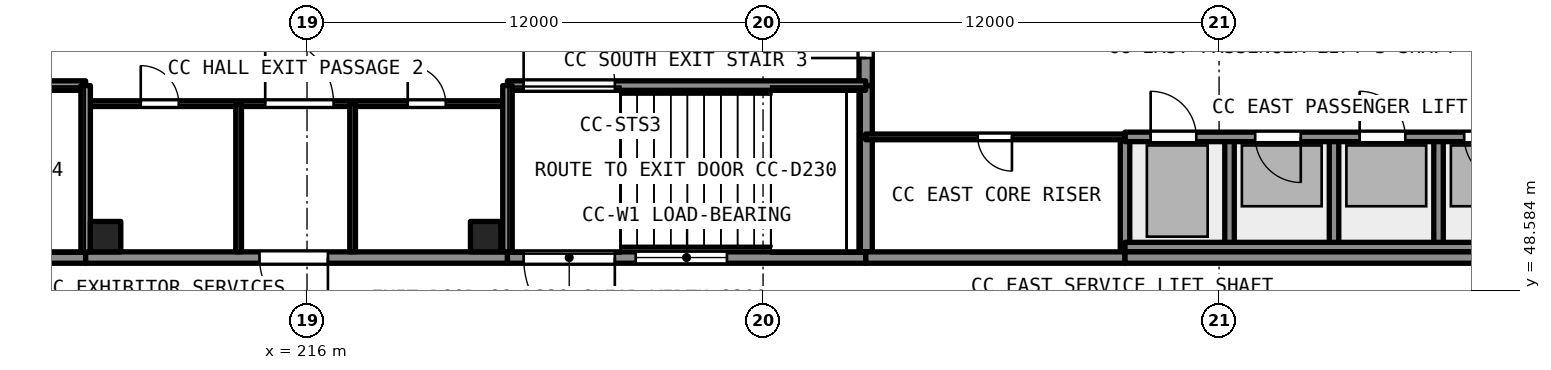
"""IFC4 building model, lengths in metres.
Left out: names, types, materials, properties, quantities, classifications, styles, units other than length and angle.
Written with IfcOpenShell. Run it as: python <this file> out.ifc"""

import sys

from ifc_helpers import new_model, si_unit, direction, frame, frame_2d, origin, origin_2d, place, context, subcontext, project, spatial, rectangle, extrude, element, fill, save


model = new_model("IFC4")
c1 = context("Model", 3, precision=1e-05, world=origin(), true_north=direction((0.0, 1.0)))
c2 = subcontext(c1, "Body", "Model", "MODEL_VIEW")
j1 = project(units=[si_unit("LENGTHUNIT", "METRE"), si_unit("PLANEANGLEUNIT", "RADIAN")], contexts=[c1])
p1 = place(None, origin())
s1 = spatial("IfcSite", under=j1, at=p1, CompositionType="ELEMENT")
p2 = place(p1, origin())
s2 = spatial("IfcBuilding", under=s1, at=p2, CompositionType="ELEMENT")
p3 = place(p2, origin())
s3 = spatial("IfcBuildingStorey", under=s2, at=p3, CompositionType="ELEMENT", Elevation=0.0)
for number, where, z_axis, x_axis in (
    (1, (210.7, 50.0, -1.2), (0.0, 0.0, 1.0), (1.0, 0.0, 0.0)),
    (2, (220.7, 50.0, -1.2), (0.0, 0.0, 1.0), (1.0, 0.0, 0.0)),
):
    element("IfcColumn", number, at=place(p3, frame(where, z_axis=z_axis, x_axis=x_axis)), inside=s3, PredefinedType="COLUMN", context=c2, shape_type="SweptSolid", body=[
        extrude(rectangle(XDim=0.8, YDim=0.8, at=origin_2d()), origin(), (0.0, 0.0, 1.0), 10.2),
    ])
p4 = place(p3, frame((230.7, 49.6, 0.0), z_axis=(0.0, 0.0, 1.0), x_axis=(0.0, 1.0, 0.0)))
e3 = element("IfcWall", 3, at=p4, inside=s3, PredefinedType="SHEAR", context=c2, shape_type="SweptSolid", body=[
    extrude(rectangle(XDim=4.375, YDim=0.35, at=frame_2d((2.188, 0.0))), origin(), (0.0, 0.0, 1.0), 8.59),
])
p5 = place(p3, frame((230.7, 53.975, 0.0), z_axis=(0.0, 0.0, 1.0), x_axis=(0.0, 1.0, 0.0)))
e4 = element("IfcWall", 4, at=p5, inside=s3, PredefinedType="SHEAR", context=c2, shape_type="SweptSolid", body=[
    extrude(rectangle(XDim=2.875, YDim=0.35, at=frame_2d((1.438, 0.0))), origin(), (0.0, 0.0, 1.0), 8.59),
])
p6 = place(p5, frame((0.725, 0.0, 0.0)))
e5 = element("IfcOpeningElement", 5, at=p6, cuts=e4, PredefinedType="OPENING", context=c2, shape_type="SweptSolid", body=[
    extrude(rectangle(XDim=1.8, YDim=2.1, at=frame_2d((0.9, 1.05))), frame((0.0, 0.186, 0.0), z_axis=(0.0, -1.0, 0.0), x_axis=(1.0, 0.0, 0.0)), (0.0, 0.0, 1.0), 0.371),
])
for number, where, z_axis, x_axis in (
    (6, (245.775, 49.6, -1.2), (0.0, 0.0, 1.0), (0.0, 1.0, 0.0)),
    (7, (243.025, 49.6, -1.2), (0.0, 0.0, 1.0), (0.0, 1.0, 0.0)),
    (8, (240.275, 49.6, -1.2), (0.0, 0.0, 1.0), (0.0, 1.0, 0.0)),
    (9, (237.525, 49.6, -1.2), (0.0, 0.0, 1.0), (0.0, 1.0, 0.0)),
):
    element("IfcWall", number, at=place(p3, frame(where, z_axis=z_axis, x_axis=x_axis)), inside=s3, PredefinedType="SHEAR", context=c2, shape_type="SweptSolid", body=[
        extrude(rectangle(XDim=3.025, YDim=0.25, at=frame_2d((1.512, 0.0))), origin(), (0.0, 0.0, 1.0), 26.19),
    ])
p7 = place(p3, frame((237.525, 52.625, -1.2), z_axis=(0.0, 0.0, 1.0), x_axis=(1.0, 0.0, 0.0)))
e10 = element("IfcWall", 10, at=p7, inside=s3, PredefinedType="SHEAR", context=c2, shape_type="SweptSolid", body=[
    extrude(rectangle(XDim=11.0, YDim=0.25, at=frame_2d((5.5, 0.0))), origin(), (0.0, 0.0, 1.0), 26.19),
])
p8 = place(p7, frame((8.925, 0.0, 1.2)))
e11 = element("IfcOpeningElement", 11, at=p8, cuts=e10, PredefinedType="OPENING", context=c2, shape_type="SweptSolid", body=[
    extrude(rectangle(XDim=1.2, YDim=2.1, at=frame_2d((0.6, 1.05))), frame((0.0, 0.135, 0.0), z_axis=(0.0, -1.0, 0.0), x_axis=(1.0, 0.0, 0.0)), (0.0, 0.0, 1.0), 0.271),
])
p9 = place(p7, frame((6.175, 0.0, 1.2)))
e12 = element("IfcOpeningElement", 12, at=p9, cuts=e10, PredefinedType="OPENING", context=c2, shape_type="SweptSolid", body=[
    extrude(rectangle(XDim=1.2, YDim=2.1, at=frame_2d((0.6, 1.05))), frame((0.0, 0.135, 0.0), z_axis=(0.0, -1.0, 0.0), x_axis=(1.0, 0.0, 0.0)), (0.0, 0.0, 1.0), 0.271),
])
p10 = place(p7, frame((3.425, 0.0, 1.2)))
e13 = element("IfcOpeningElement", 13, at=p10, cuts=e10, PredefinedType="OPENING", context=c2, shape_type="SweptSolid", body=[
    extrude(rectangle(XDim=1.2, YDim=2.1, at=frame_2d((0.6, 1.05))), frame((0.0, 0.135, 0.0), z_axis=(0.0, -1.0, 0.0), x_axis=(1.0, 0.0, 0.0)), (0.0, 0.0, 1.0), 0.271),
])
p11 = place(p7, frame((0.675, 0.0, 1.2)))
e14 = element("IfcOpeningElement", 14, at=p11, cuts=e10, PredefinedType="OPENING", context=c2, shape_type="SweptSolid", body=[
    extrude(rectangle(XDim=1.2, YDim=2.1, at=frame_2d((0.6, 1.05))), frame((0.0, 0.135, 0.0), z_axis=(0.0, -1.0, 0.0), x_axis=(1.0, 0.0, 0.0)), (0.0, 0.0, 1.0), 0.271),
])
p12 = place(p7, frame((8.925, 0.0, 10.2)))
e15 = element("IfcOpeningElement", 15, at=p12, cuts=e10, PredefinedType="OPENING", context=c2, shape_type="SweptSolid", body=[
    extrude(rectangle(XDim=1.2, YDim=2.1, at=frame_2d((0.6, 1.05))), frame((0.0, 0.135, 0.0), z_axis=(0.0, -1.0, 0.0), x_axis=(1.0, 0.0, 0.0)), (0.0, 0.0, 1.0), 0.271),
])
p13 = place(p7, frame((6.175, 0.0, 10.2)))
e16 = element("IfcOpeningElement", 16, at=p13, cuts=e10, PredefinedType="OPENING", context=c2, shape_type="SweptSolid", body=[
    extrude(rectangle(XDim=1.2, YDim=2.1, at=frame_2d((0.6, 1.05))), frame((0.0, 0.135, 0.0), z_axis=(0.0, -1.0, 0.0), x_axis=(1.0, 0.0, 0.0)), (0.0, 0.0, 1.0), 0.271),
])
p14 = place(p7, frame((3.425, 0.0, 10.2)))
e17 = element("IfcOpeningElement", 17, at=p14, cuts=e10, PredefinedType="OPENING", context=c2, shape_type="SweptSolid", body=[
    extrude(rectangle(XDim=1.2, YDim=2.1, at=frame_2d((0.6, 1.05))), frame((0.0, 0.135, 0.0), z_axis=(0.0, -1.0, 0.0), x_axis=(1.0, 0.0, 0.0)), (0.0, 0.0, 1.0), 0.271),
])
p15 = place(p7, frame((0.675, 0.0, 10.2)))
e18 = element("IfcOpeningElement", 18, at=p15, cuts=e10, PredefinedType="OPENING", context=c2, shape_type="SweptSolid", body=[
    extrude(rectangle(XDim=1.2, YDim=2.1, at=frame_2d((0.6, 1.05))), frame((0.0, 0.135, 0.0), z_axis=(0.0, -1.0, 0.0), x_axis=(1.0, 0.0, 0.0)), (0.0, 0.0, 1.0), 0.271),
])
p16 = place(p7, frame((8.925, 0.0, 16.2)))
e19 = element("IfcOpeningElement", 19, at=p16, cuts=e10, PredefinedType="OPENING", context=c2, shape_type="SweptSolid", body=[
    extrude(rectangle(XDim=1.2, YDim=2.1, at=frame_2d((0.6, 1.05))), frame((0.0, 0.135, 0.0), z_axis=(0.0, -1.0, 0.0), x_axis=(1.0, 0.0, 0.0)), (0.0, 0.0, 1.0), 0.271),
])
p17 = place(p7, frame((6.175, 0.0, 16.2)))
e20 = element("IfcOpeningElement", 20, at=p17, cuts=e10, PredefinedType="OPENING", context=c2, shape_type="SweptSolid", body=[
    extrude(rectangle(XDim=1.2, YDim=2.1, at=frame_2d((0.6, 1.05))), frame((0.0, 0.135, 0.0), z_axis=(0.0, -1.0, 0.0), x_axis=(1.0, 0.0, 0.0)), (0.0, 0.0, 1.0), 0.271),
])
p18 = place(p7, frame((3.425, 0.0, 16.2)))
e21 = element("IfcOpeningElement", 21, at=p18, cuts=e10, PredefinedType="OPENING", context=c2, shape_type="SweptSolid", body=[
    extrude(rectangle(XDim=1.2, YDim=2.1, at=frame_2d((0.6, 1.05))), frame((0.0, 0.135, 0.0), z_axis=(0.0, -1.0, 0.0), x_axis=(1.0, 0.0, 0.0)), (0.0, 0.0, 1.0), 0.271),
])
p19 = place(p7, frame((0.675, 0.0, 16.2)))
e22 = element("IfcOpeningElement", 22, at=p19, cuts=e10, PredefinedType="OPENING", context=c2, shape_type="SweptSolid", body=[
    extrude(rectangle(XDim=1.2, YDim=2.1, at=frame_2d((0.6, 1.05))), frame((0.0, 0.135, 0.0), z_axis=(0.0, -1.0, 0.0), x_axis=(1.0, 0.0, 0.0)), (0.0, 0.0, 1.0), 0.271),
])
p20 = place(p7, frame((8.925, 0.0, 21.6)))
e23 = element("IfcOpeningElement", 23, at=p20, cuts=e10, PredefinedType="OPENING", context=c2, shape_type="SweptSolid", body=[
    extrude(rectangle(XDim=1.2, YDim=2.1, at=frame_2d((0.6, 1.05))), frame((0.0, 0.135, 0.0), z_axis=(0.0, -1.0, 0.0), x_axis=(1.0, 0.0, 0.0)), (0.0, 0.0, 1.0), 0.271),
])
p21 = place(p7, frame((6.175, 0.0, 21.6)))
e24 = element("IfcOpeningElement", 24, at=p21, cuts=e10, PredefinedType="OPENING", context=c2, shape_type="SweptSolid", body=[
    extrude(rectangle(XDim=1.2, YDim=2.1, at=frame_2d((0.6, 1.05))), frame((0.0, 0.135, 0.0), z_axis=(0.0, -1.0, 0.0), x_axis=(1.0, 0.0, 0.0)), (0.0, 0.0, 1.0), 0.271),
])
p22 = place(p7, frame((3.425, 0.0, 21.6)))
e25 = element("IfcOpeningElement", 25, at=p22, cuts=e10, PredefinedType="OPENING", context=c2, shape_type="SweptSolid", body=[
    extrude(rectangle(XDim=1.2, YDim=2.1, at=frame_2d((0.6, 1.05))), frame((0.0, 0.135, 0.0), z_axis=(0.0, -1.0, 0.0), x_axis=(1.0, 0.0, 0.0)), (0.0, 0.0, 1.0), 0.271),
])
p23 = place(p7, frame((0.675, 0.0, 21.6)))
e26 = element("IfcOpeningElement", 26, at=p23, cuts=e10, PredefinedType="OPENING", context=c2, shape_type="SweptSolid", body=[
    extrude(rectangle(XDim=1.2, YDim=2.1, at=frame_2d((0.6, 1.05))), frame((0.0, 0.135, 0.0), z_axis=(0.0, -1.0, 0.0), x_axis=(1.0, 0.0, 0.0)), (0.0, 0.0, 1.0), 0.271),
])
p24 = place(p3, frame((237.525, 49.725, -1.2), z_axis=(0.0, 0.0, 1.0), x_axis=(1.0, 0.0, 0.0)))
e27 = element("IfcWall", 27, at=p24, inside=s3, PredefinedType="SHEAR", context=c2, shape_type="SweptSolid", body=[
    extrude(rectangle(XDim=11.0, YDim=0.25, at=frame_2d((5.5, 0.0))), origin(), (0.0, 0.0, 1.0), 26.19),
])
p25 = place(p3, frame((230.7, 49.45, 0.0), z_axis=(0.0, 0.0, 1.0), x_axis=(1.0, 0.0, 0.0)))
e28 = element("IfcWall", 28, at=p25, inside=s3, PredefinedType="SOLIDWALL", context=c2, shape_type="SweptSolid", body=[
    extrude(rectangle(XDim=6.825, YDim=0.3, at=frame_2d((3.413, 0.0))), origin(), (0.0, 0.0, 1.0), 8.59),
])
p26 = place(p3, frame((237.525, 52.625, 0.0), z_axis=(0.0, 0.0, 1.0), x_axis=(-1.0, 0.0, 0.0)))
e29 = element("IfcWall", 29, at=p26, inside=s3, PredefinedType="PARTITIONING", context=c2, shape_type="SweptSolid", body=[
    extrude(rectangle(XDim=6.825, YDim=0.15, at=frame_2d((3.413, 0.0))), origin(), (0.0, 0.0, 1.0), 8.59),
])
p27 = place(p26, frame((2.975, 0.0, 0.0)))
e30 = element("IfcOpeningElement", 30, at=p27, cuts=e29, PredefinedType="OPENING", context=c2, shape_type="SweptSolid", body=[
    extrude(rectangle(XDim=0.9, YDim=2.1, at=frame_2d((0.45, 1.05))), frame((0.0, 0.085, 0.0), z_axis=(0.0, -1.0, 0.0), x_axis=(1.0, 0.0, 0.0)), (0.0, 0.0, 1.0), 0.171),
])
p28 = place(p3, frame((210.175, 49.45, 0.0), z_axis=(0.0, 0.0, 1.0), x_axis=(-1.0, 0.0, 0.0)))
e31 = element("IfcWall", 31, at=p28, inside=s3, PredefinedType="SOLIDWALL", context=c2, shape_type="SweptSolid", body=[
    extrude(rectangle(XDim=9.15, YDim=0.3, at=frame_2d((4.575, 0.0))), origin(), (0.0, 0.0, 1.0), 8.59),
])
p29 = place(p28, frame((6.325, 0.0, 0.0)))
e32 = element("IfcOpeningElement", 32, at=p29, cuts=e31, PredefinedType="OPENING", context=c2, shape_type="SweptSolid", body=[
    extrude(rectangle(XDim=2.4, YDim=2.1, at=frame_2d((1.2, 1.05))), frame((0.0, 0.161, 0.0), z_axis=(0.0, -1.0, 0.0), x_axis=(1.0, 0.0, 0.0)), (0.0, 0.0, 1.0), 0.321),
])
p30 = place(p28, frame((3.375, 0.0, 0.9)))
e33 = element("IfcOpeningElement", 33, at=p30, cuts=e31, PredefinedType="OPENING", context=c2, shape_type="SweptSolid", body=[
    extrude(rectangle(XDim=2.4, YDim=1.8, at=frame_2d((1.2, 0.9))), frame((0.0, 0.161, 0.0), z_axis=(0.0, -1.0, 0.0), x_axis=(1.0, 0.0, 0.0)), (0.0, 0.0, 1.0), 0.321),
])
p31 = place(p3, frame((221.275, 49.45, 0.0), z_axis=(0.0, 0.0, 1.0), x_axis=(-1.0, 0.0, 0.0)))
e34 = element("IfcWall", 34, at=p31, inside=s3, PredefinedType="SOLIDWALL", context=c2, shape_type="SweptSolid", body=[
    extrude(rectangle(XDim=11.1, YDim=0.3, at=frame_2d((5.55, 0.0))), origin(), (0.0, 0.0, 1.0), 8.59),
])
p32 = place(p31, frame((4.725, 0.0, 0.0)))
e35 = element("IfcOpeningElement", 35, at=p32, cuts=e34, PredefinedType="OPENING", context=c2, shape_type="SweptSolid", body=[
    extrude(rectangle(XDim=1.8, YDim=2.1, at=frame_2d((0.9, 1.05))), frame((0.0, 0.161, 0.0), z_axis=(0.0, -1.0, 0.0), x_axis=(1.0, 0.0, 0.0)), (0.0, 0.0, 1.0), 0.321),
])
p33 = place(p3, frame((230.7, 49.45, 0.0), z_axis=(0.0, 0.0, 1.0), x_axis=(-1.0, 0.0, 0.0)))
e36 = element("IfcWall", 36, at=p33, inside=s3, PredefinedType="SOLIDWALL", context=c2, shape_type="SweptSolid", body=[
    extrude(rectangle(XDim=9.425, YDim=0.3, at=frame_2d((4.712, 0.0))), origin(), (0.0, 0.0, 1.0), 8.59),
])
p34 = place(p33, frame((6.6, 0.0, 0.0)))
e37 = element("IfcOpeningElement", 37, at=p34, cuts=e36, PredefinedType="OPENING", context=c2, shape_type="SweptSolid", body=[
    extrude(rectangle(XDim=2.4, YDim=2.1, at=frame_2d((1.2, 1.05))), frame((0.0, 0.161, 0.0), z_axis=(0.0, -1.0, 0.0), x_axis=(1.0, 0.0, 0.0)), (0.0, 0.0, 1.0), 0.321),
])
p35 = place(p33, frame((3.65, 0.0, 0.9)))
e38 = element("IfcOpeningElement", 38, at=p35, cuts=e36, PredefinedType="OPENING", context=c2, shape_type="SweptSolid", body=[
    extrude(rectangle(XDim=2.4, YDim=1.8, at=frame_2d((1.2, 0.9))), frame((0.0, 0.161, 0.0), z_axis=(0.0, -1.0, 0.0), x_axis=(1.0, 0.0, 0.0)), (0.0, 0.0, 1.0), 0.321),
])
p36 = place(p3, frame((237.525, 49.45, 0.0), z_axis=(0.0, 0.0, 1.0), x_axis=(1.0, 0.0, 0.0)))
e39 = element("IfcWall", 39, at=p36, inside=s3, PredefinedType="SOLIDWALL", context=c2, shape_type="SweptSolid", body=[
    extrude(rectangle(XDim=11.0, YDim=0.3, at=frame_2d((5.5, 0.0))), origin(), (0.0, 0.0, 1.0), 8.59),
])
p37 = place(p3, frame((210.175, 53.5, 0.0), z_axis=(0.0, 0.0, 1.0), x_axis=(1.0, 0.0, 0.0)))
e40 = element("IfcWall", 40, at=p37, inside=s3, PredefinedType="PARTITIONING", context=c2, shape_type="SweptSolid", body=[
    extrude(rectangle(XDim=11.1, YDim=0.15, at=frame_2d((5.55, 0.0))), origin(), (0.0, 0.0, 1.0), 8.59),
])
p38 = place(p37, frame((8.475, 0.0, 0.0)))
e41 = element("IfcOpeningElement", 41, at=p38, cuts=e40, PredefinedType="OPENING", context=c2, shape_type="SweptSolid", body=[
    extrude(rectangle(XDim=1.0, YDim=2.1, at=frame_2d((0.5, 1.05))), frame((0.0, 0.085, 0.0), z_axis=(0.0, -1.0, 0.0), x_axis=(1.0, 0.0, 0.0)), (0.0, 0.0, 1.0), 0.171),
])
p39 = place(p37, frame((1.45, 0.0, 0.0)))
e42 = element("IfcOpeningElement", 42, at=p39, cuts=e40, PredefinedType="OPENING", context=c2, shape_type="SweptSolid", body=[
    extrude(rectangle(XDim=1.0, YDim=2.1, at=frame_2d((0.5, 1.05))), frame((0.0, 0.085, 0.0), z_axis=(0.0, -1.0, 0.0), x_axis=(1.0, 0.0, 0.0)), (0.0, 0.0, 1.0), 0.171),
])
p40 = place(p37, frame((4.725, 0.0, 0.0)))
e43 = element("IfcOpeningElement", 43, at=p40, cuts=e40, PredefinedType="OPENING", context=c2, shape_type="SweptSolid", body=[
    extrude(rectangle(XDim=1.8, YDim=2.1, at=frame_2d((0.9, 1.05))), frame((0.0, 0.085, 0.0), z_axis=(0.0, -1.0, 0.0), x_axis=(1.0, 0.0, 0.0)), (0.0, 0.0, 1.0), 0.171),
])
p41 = place(p3, frame((201.025, 53.975, 0.0), z_axis=(0.0, 0.0, 1.0), x_axis=(1.0, 0.0, 0.0)))
e44 = element("IfcWall", 44, at=p41, inside=s3, PredefinedType="SHEAR", context=c2, shape_type="SweptSolid", body=[
    extrude(rectangle(XDim=9.15, YDim=0.25, at=frame_2d((4.575, 0.0))), origin(), (0.0, 0.0, 1.0), 8.59),
])
p42 = place(p41, frame((0.425, 0.0, 0.0)))
e45 = element("IfcOpeningElement", 45, at=p42, cuts=e44, PredefinedType="OPENING", context=c2, shape_type="SweptSolid", body=[
    extrude(rectangle(XDim=2.4, YDim=2.1, at=frame_2d((1.2, 1.05))), frame((0.0, 0.135, 0.0), z_axis=(0.0, -1.0, 0.0), x_axis=(1.0, 0.0, 0.0)), (0.0, 0.0, 1.0), 0.271),
])
p43 = place(p3, frame((210.175, 49.6, 0.0), z_axis=(0.0, 0.0, 1.0), x_axis=(0.0, 1.0, 0.0)))
e46 = element("IfcWall", 46, at=p43, inside=s3, PredefinedType="SHEAR", context=c2, shape_type="SweptSolid", body=[
    extrude(rectangle(XDim=4.375, YDim=0.25, at=frame_2d((2.188, 0.0))), origin(), (0.0, 0.0, 1.0), 8.59),
])
p44 = place(p3, frame((221.275, 53.975, 0.0), z_axis=(0.0, 0.0, 1.0), x_axis=(1.0, 0.0, 0.0)))
e47 = element("IfcWall", 47, at=p44, inside=s3, PredefinedType="SHEAR", context=c2, shape_type="SweptSolid", body=[
    extrude(rectangle(XDim=9.425, YDim=0.25, at=frame_2d((4.712, 0.0))), origin(), (0.0, 0.0, 1.0), 8.59),
])
p45 = place(p44, frame((0.425, 0.0, 0.0)))
e48 = element("IfcOpeningElement", 48, at=p45, cuts=e47, PredefinedType="OPENING", context=c2, shape_type="SweptSolid", body=[
    extrude(rectangle(XDim=2.4, YDim=2.1, at=frame_2d((1.2, 1.05))), frame((0.0, 0.135, 0.0), z_axis=(0.0, -1.0, 0.0), x_axis=(1.0, 0.0, 0.0)), (0.0, 0.0, 1.0), 0.271),
])
p46 = place(p3, frame((221.275, 49.6, 0.0), z_axis=(0.0, 0.0, 1.0), x_axis=(0.0, 1.0, 0.0)))
e49 = element("IfcWall", 49, at=p46, inside=s3, PredefinedType="SHEAR", context=c2, shape_type="SweptSolid", body=[
    extrude(rectangle(XDim=4.375, YDim=0.25, at=frame_2d((2.188, 0.0))), origin(), (0.0, 0.0, 1.0), 8.59),
])
for number, where, z_axis, x_axis in (
    (50, (214.2, 49.6, 0.0), (0.0, 0.0, 1.0), (0.0, 1.0, 0.0)),
    (51, (217.2, 49.6, 0.0), (0.0, 0.0, 1.0), (0.0, 1.0, 0.0)),
):
    element("IfcWall", number, at=place(p3, frame(where, z_axis=z_axis, x_axis=x_axis)), inside=s3, PredefinedType="PARTITIONING", context=c2, shape_type="SweptSolid", body=[
        extrude(rectangle(XDim=3.9, YDim=0.15, at=frame_2d((1.95, 0.0))), origin(), (0.0, 0.0, 1.0), 8.59),
    ])
p47 = place(p38, origin())
e52 = element("IfcDoor", 52, at=p47, inside=s3, OperationType="SINGLE_SWING_LEFT", PredefinedType="DOOR", context=c2, shape_type="SweptSolid", body=[
    extrude(rectangle(XDim=1.0, YDim=2.1, at=frame_2d((0.5, 1.05))), frame((0.0, 0.025, 0.0), z_axis=(0.0, -1.0, 0.0), x_axis=(1.0, 0.0, 0.0)), (0.0, 0.0, 1.0), 0.05),
])
fill(e41, e52)
p48 = place(p39, origin())
e53 = element("IfcDoor", 53, at=p48, inside=s3, OperationType="SINGLE_SWING_LEFT", PredefinedType="DOOR", context=c2, shape_type="SweptSolid", body=[
    extrude(rectangle(XDim=1.0, YDim=2.1, at=frame_2d((0.5, 1.05))), frame((0.0, 0.025, 0.0), z_axis=(0.0, -1.0, 0.0), x_axis=(1.0, 0.0, 0.0)), (0.0, 0.0, 1.0), 0.05),
])
fill(e42, e53)
p49 = place(p40, origin())
e54 = element("IfcDoor", 54, at=p49, inside=s3, OperationType="DOUBLE_DOOR_SINGLE_SWING", PredefinedType="DOOR", context=c2, shape_type="SweptSolid", body=[
    extrude(rectangle(XDim=1.8, YDim=2.1, at=frame_2d((0.9, 1.05))), frame((0.0, 0.025, 0.0), z_axis=(0.0, -1.0, 0.0), x_axis=(1.0, 0.0, 0.0)), (0.0, 0.0, 1.0), 0.05),
])
fill(e43, e54)
p50 = place(p6, origin())
e55 = element("IfcDoor", 55, at=p50, inside=s3, OperationType="DOUBLE_DOOR_SINGLE_SWING", PredefinedType="DOOR", context=c2, shape_type="SweptSolid", body=[
    extrude(rectangle(XDim=1.8, YDim=2.1, at=frame_2d((0.9, 1.05))), frame((0.0, 0.025, 0.0), z_axis=(0.0, -1.0, 0.0), x_axis=(1.0, 0.0, 0.0)), (0.0, 0.0, 1.0), 0.05),
])
fill(e5, e55)
p51 = place(p32, origin())
e56 = element("IfcDoor", 56, at=p51, inside=s3, OperationType="DOUBLE_DOOR_SINGLE_SWING", PredefinedType="DOOR", context=c2, shape_type="SweptSolid", body=[
    extrude(rectangle(XDim=1.8, YDim=2.1, at=frame_2d((0.9, 1.05))), frame((0.0, 0.025, 0.0), z_axis=(0.0, -1.0, 0.0), x_axis=(1.0, 0.0, 0.0)), (0.0, 0.0, 1.0), 0.05),
])
fill(e35, e56)
p52 = place(p8, origin())
e57 = element("IfcDoor", 57, at=p52, inside=s3, OperationType="SLIDING_TO_RIGHT", PredefinedType="DOOR", context=c2, shape_type="SweptSolid", body=[
    extrude(rectangle(XDim=1.2, YDim=2.1, at=frame_2d((0.6, 1.05))), frame((0.0, 0.025, 0.0), z_axis=(0.0, -1.0, 0.0), x_axis=(1.0, 0.0, 0.0)), (0.0, 0.0, 1.0), 0.05),
])
fill(e11, e57)
p53 = place(p9, origin())
e58 = element("IfcDoor", 58, at=p53, inside=s3, OperationType="SLIDING_TO_LEFT", PredefinedType="DOOR", context=c2, shape_type="SweptSolid", body=[
    extrude(rectangle(XDim=1.2, YDim=2.1, at=frame_2d((0.6, 1.05))), frame((0.0, 0.025, 0.0), z_axis=(0.0, -1.0, 0.0), x_axis=(1.0, 0.0, 0.0)), (0.0, 0.0, 1.0), 0.05),
])
fill(e12, e58)
p54 = place(p10, origin())
e59 = element("IfcDoor", 59, at=p54, inside=s3, OperationType="SLIDING_TO_RIGHT", PredefinedType="DOOR", context=c2, shape_type="SweptSolid", body=[
    extrude(rectangle(XDim=1.2, YDim=2.1, at=frame_2d((0.6, 1.05))), frame((0.0, 0.025, 0.0), z_axis=(0.0, -1.0, 0.0), x_axis=(1.0, 0.0, 0.0)), (0.0, 0.0, 1.0), 0.05),
])
fill(e13, e59)
p55 = place(p11, origin())
e60 = element("IfcDoor", 60, at=p55, inside=s3, OperationType="SLIDING_TO_LEFT", PredefinedType="DOOR", context=c2, shape_type="SweptSolid", body=[
    extrude(rectangle(XDim=1.2, YDim=2.1, at=frame_2d((0.6, 1.05))), frame((0.0, 0.025, 0.0), z_axis=(0.0, -1.0, 0.0), x_axis=(1.0, 0.0, 0.0)), (0.0, 0.0, 1.0), 0.05),
])
fill(e14, e60)
p56 = place(p27, origin())
e61 = element("IfcDoor", 61, at=p56, inside=s3, OperationType="SINGLE_SWING_LEFT", PredefinedType="DOOR", context=c2, shape_type="SweptSolid", body=[
    extrude(rectangle(XDim=0.9, YDim=2.1, at=frame_2d((0.45, 1.05))), frame((0.0, 0.025, 0.0), z_axis=(0.0, -1.0, 0.0), x_axis=(1.0, 0.0, 0.0)), (0.0, 0.0, 1.0), 0.05),
])
fill(e30, e61)
p57 = place(p45, origin())
e62 = element("IfcDoor", 62, at=p57, inside=s3, OperationType="DOUBLE_DOOR_SINGLE_SWING", PredefinedType="DOOR", context=c2, shape_type="SweptSolid", body=[
    extrude(rectangle(XDim=2.4, YDim=2.1, at=frame_2d((1.2, 1.05))), frame((0.0, 0.025, 0.0), z_axis=(0.0, -1.0, 0.0), x_axis=(1.0, 0.0, 0.0)), (0.0, 0.0, 1.0), 0.05),
])
fill(e48, e62)
p58 = place(p34, origin())
e63 = element("IfcDoor", 63, at=p58, inside=s3, OperationType="DOUBLE_DOOR_SINGLE_SWING", PredefinedType="DOOR", context=c2, shape_type="SweptSolid", body=[
    extrude(rectangle(XDim=2.4, YDim=2.1, at=frame_2d((1.2, 1.05))), frame((0.0, 0.025, 0.0), z_axis=(0.0, -1.0, 0.0), x_axis=(1.0, 0.0, 0.0)), (0.0, 0.0, 1.0), 0.05),
])
fill(e37, e63)
p59 = place(p35, origin())
e64 = element("IfcWindow", 64, at=p59, inside=s3, PartitioningType="DOUBLE_PANEL_VERTICAL", PredefinedType="WINDOW", context=c2, shape_type="SweptSolid", body=[
    extrude(rectangle(XDim=2.4, YDim=1.8, at=frame_2d((1.2, 0.9))), frame((0.0, 0.03, 0.0), z_axis=(0.0, -1.0, 0.0), x_axis=(1.0, 0.0, 0.0)), (0.0, 0.0, 1.0), 0.06),
])
fill(e38, e64)
save(model, sys.argv[1])
